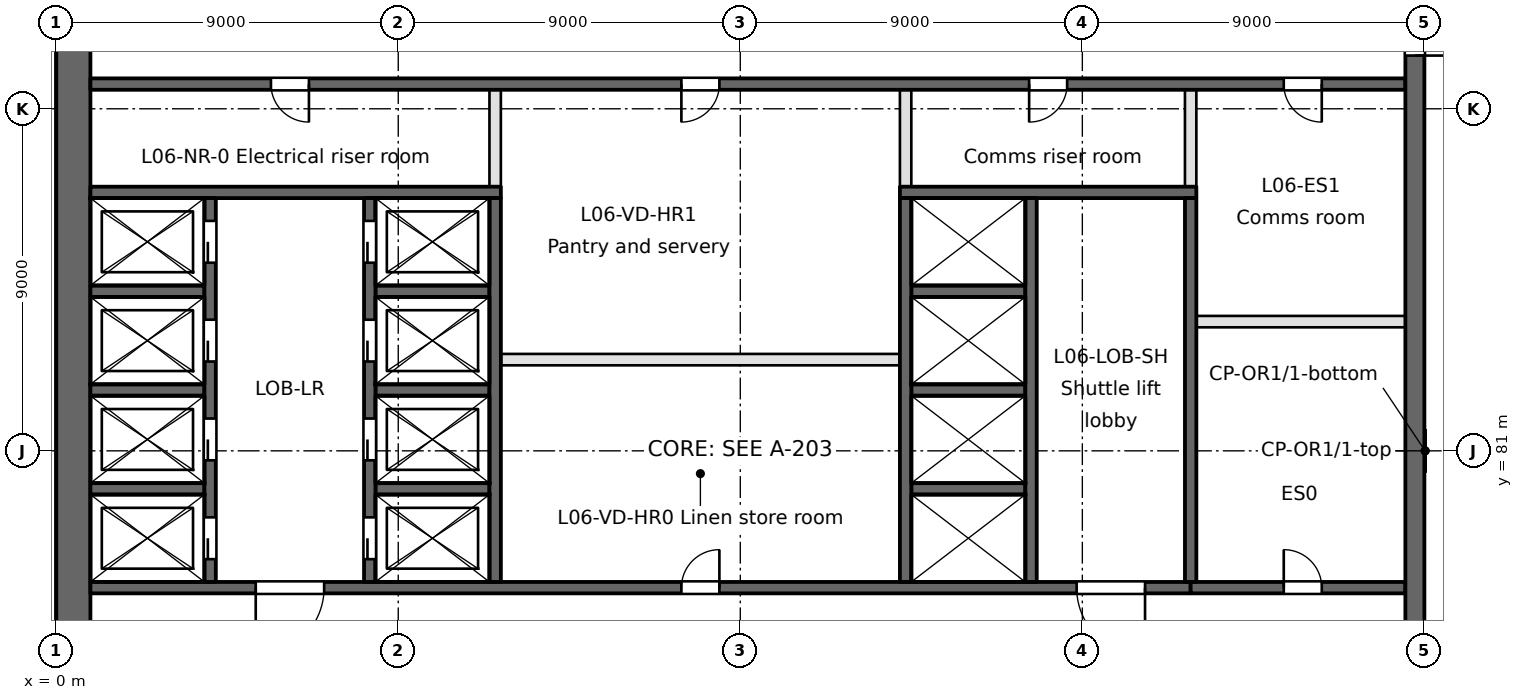
"""IFC4 building model, lengths in metres.
Left out: names, types, materials, properties, quantities, classifications, styles, units other than length and angle.
Written with IfcOpenShell. Run it as: python <this file> out.ifc"""

import sys

from ifc_helpers import new_model, si_unit, direction, frame, frame_2d, origin, place, context, subcontext, project, spatial, rectangle, extrude, element, fill, save


model = new_model("IFC4")
c1 = context("Model", 3, precision=1e-05, world=origin(), true_north=direction((0.0, 1.0)))
c2 = subcontext(c1, "Body", "Model", "MODEL_VIEW")
j1 = project(units=[si_unit("LENGTHUNIT", "METRE"), si_unit("PLANEANGLEUNIT", "RADIAN")], contexts=[c1])
p1 = place(None, origin())
s1 = spatial("IfcSite", under=j1, at=p1, CompositionType="ELEMENT")
p2 = place(p1, origin())
s2 = spatial("IfcBuilding", under=s1, at=p2, CompositionType="ELEMENT")
p3 = place(p2, frame((0.0, 0.0, 31.2)))
s3 = spatial("IfcBuildingStorey", under=s2, at=p3, CompositionType="ELEMENT", Elevation=31.2)
p4 = place(p3, frame((0.45, 94.5, 0.0), z_axis=(0.0, 0.0, 1.0), x_axis=(0.0, -1.0, 0.0)))
e1 = element("IfcWall", 1, at=p4, inside=s3, PredefinedType="SHEAR", context=c2, shape_type="SweptSolid", body=[
    extrude(rectangle(XDim=66.085, YDim=0.9, at=frame_2d((33.042, 0.0))), origin(), (0.0, 0.0, 1.0), 4.6),
])
p5 = place(p3, frame((0.9, 77.4, -0.45), z_axis=(0.0, 0.0, 1.0), x_axis=(1.0, 0.0, 0.0)))
e2 = element("IfcWall", 2, at=p5, inside=s3, PredefinedType="SOLIDWALL", context=c2, shape_type="SweptSolid", body=[
    extrude(rectangle(XDim=28.95, YDim=0.3, at=frame_2d((14.475, 0.0))), origin(), (0.0, 0.0, 1.0), 4.65),
])
p6 = place(p5, frame((4.35, 0.0, 0.45)))
e3 = element("IfcOpeningElement", 3, at=p6, cuts=e2, PredefinedType="OPENING", context=c2, shape_type="SweptSolid", body=[
    extrude(rectangle(XDim=1.8, YDim=2.1, at=frame_2d((0.9, 1.05))), frame((0.0, 0.15, 0.0), z_axis=(0.0, -1.0, 0.0), x_axis=(1.0, 0.0, 0.0)), (0.0, 0.0, 1.0), 0.3),
])
p7 = place(p5, frame((25.95, 0.0, 0.45)))
e4 = element("IfcOpeningElement", 4, at=p7, cuts=e2, PredefinedType="OPENING", context=c2, shape_type="SweptSolid", body=[
    extrude(rectangle(XDim=1.8, YDim=2.1, at=frame_2d((0.9, 1.05))), frame((0.0, 0.15, 0.0), z_axis=(0.0, -1.0, 0.0), x_axis=(1.0, 0.0, 0.0)), (0.0, 0.0, 1.0), 0.3),
])
p8 = place(p5, frame((15.55, 0.0, 0.45)))
e5 = element("IfcOpeningElement", 5, at=p8, cuts=e2, PredefinedType="OPENING", context=c2, shape_type="SweptSolid", body=[
    extrude(rectangle(XDim=1.0, YDim=2.1, at=frame_2d((0.5, 1.05))), frame((0.0, 0.15, 0.0), z_axis=(0.0, -1.0, 0.0), x_axis=(1.0, 0.0, 0.0)), (0.0, 0.0, 1.0), 0.3),
])
p9 = place(p3, frame((29.85, 77.4, 0.0), z_axis=(0.0, 0.0, 1.0), x_axis=(1.0, 0.0, 0.0)))
e6 = element("IfcWall", 6, at=p9, inside=s3, PredefinedType="SOLIDWALL", context=c2, shape_type="SweptSolid", body=[
    extrude(rectangle(XDim=5.65, YDim=0.3, at=frame_2d((2.825, 0.0))), origin(), (0.0, 0.0, 1.0), 4.2),
])
p10 = place(p9, frame((2.45, 0.0, 0.0)))
e7 = element("IfcOpeningElement", 7, at=p10, cuts=e6, PredefinedType="OPENING", context=c2, shape_type="SweptSolid", body=[
    extrude(rectangle(XDim=1.0, YDim=2.1, at=frame_2d((0.5, 1.05))), frame((0.0, 0.15, 0.0), z_axis=(0.0, -1.0, 0.0), x_axis=(1.0, 0.0, 0.0)), (0.0, 0.0, 1.0), 0.3),
])
for number, where, z_axis, x_axis in (
    (8, (0.9, 80.0, -0.45), (0.0, 0.0, 1.0), (1.0, 0.0, 0.0)),
    (9, (8.4, 80.0, -0.45), (0.0, 0.0, 1.0), (1.0, 0.0, 0.0)),
    (10, (22.5, 80.0, -0.45), (0.0, 0.0, 1.0), (1.0, 0.0, 0.0)),
    (11, (0.9, 82.6, -0.45), (0.0, 0.0, 1.0), (1.0, 0.0, 0.0)),
    (12, (8.4, 82.6, -0.45), (0.0, 0.0, 1.0), (1.0, 0.0, 0.0)),
    (13, (22.5, 82.6, -0.45), (0.0, 0.0, 1.0), (1.0, 0.0, 0.0)),
):
    element("IfcWall", number, at=place(p3, frame(where, z_axis=z_axis, x_axis=x_axis)), inside=s3, PredefinedType="SOLIDWALL", context=c2, shape_type="SweptSolid", body=[
        extrude(rectangle(XDim=3.0, YDim=0.3, at=frame_2d((1.5, 0.0))), origin(), (0.0, 0.0, 1.0), 4.65),
    ])
p11 = place(p3, frame((11.7, 83.4, 0.0), z_axis=(0.0, 0.0, 1.0), x_axis=(1.0, 0.0, 0.0)))
e14 = element("IfcWall", 14, at=p11, inside=s3, PredefinedType="PARTITIONING", context=c2, shape_type="SweptSolid", body=[
    extrude(rectangle(XDim=10.5, YDim=0.3, at=frame_2d((5.25, 0.0))), origin(), (0.0, 0.0, 1.0), 4.2),
])
p12 = place(p3, frame((30.0, 84.4, 0.0), z_axis=(0.0, 0.0, 1.0), x_axis=(1.0, 0.0, 0.0)))
e15 = element("IfcWall", 15, at=p12, inside=s3, PredefinedType="PARTITIONING", context=c2, shape_type="SweptSolid", body=[
    extrude(rectangle(XDim=5.5, YDim=0.3, at=frame_2d((2.75, 0.0))), origin(), (0.0, 0.0, 1.0), 4.2),
])
for number, where, z_axis, x_axis in (
    (16, (0.9, 85.2, -0.45), (0.0, 0.0, 1.0), (1.0, 0.0, 0.0)),
    (17, (8.4, 85.2, -0.45), (0.0, 0.0, 1.0), (1.0, 0.0, 0.0)),
    (18, (22.5, 85.2, -0.45), (0.0, 0.0, 1.0), (1.0, 0.0, 0.0)),
):
    element("IfcWall", number, at=place(p3, frame(where, z_axis=z_axis, x_axis=x_axis)), inside=s3, PredefinedType="SOLIDWALL", context=c2, shape_type="SweptSolid", body=[
        extrude(rectangle(XDim=3.0, YDim=0.3, at=frame_2d((1.5, 0.0))), origin(), (0.0, 0.0, 1.0), 4.65),
    ])
p13 = place(p3, frame((0.9, 87.8, -0.45), z_axis=(0.0, 0.0, 1.0), x_axis=(1.0, 0.0, 0.0)))
e19 = element("IfcWall", 19, at=p13, inside=s3, PredefinedType="SOLIDWALL", context=c2, shape_type="SweptSolid", body=[
    extrude(rectangle(XDim=10.8, YDim=0.3, at=frame_2d((5.4, 0.0))), origin(), (0.0, 0.0, 1.0), 4.65),
])
p14 = place(p3, frame((22.2, 87.8, -0.45), z_axis=(0.0, 0.0, 1.0), x_axis=(1.0, 0.0, 0.0)))
e20 = element("IfcWall", 20, at=p14, inside=s3, PredefinedType="SOLIDWALL", context=c2, shape_type="SweptSolid", body=[
    extrude(rectangle(XDim=7.8, YDim=0.3, at=frame_2d((3.9, 0.0))), origin(), (0.0, 0.0, 1.0), 4.65),
])
p15 = place(p3, frame((0.9, 90.65, -0.45), z_axis=(0.0, 0.0, 1.0), x_axis=(1.0, 0.0, 0.0)))
e21 = element("IfcWall", 21, at=p15, inside=s3, PredefinedType="SOLIDWALL", context=c2, shape_type="SweptSolid", body=[
    extrude(rectangle(XDim=34.6, YDim=0.3, at=frame_2d((17.3, 0.0))), origin(), (0.0, 0.0, 1.0), 4.65),
])
p16 = place(p15, frame((4.75, 0.0, 0.45)))
e22 = element("IfcOpeningElement", 22, at=p16, cuts=e21, PredefinedType="OPENING", context=c2, shape_type="SweptSolid", body=[
    extrude(rectangle(XDim=1.0, YDim=2.1, at=frame_2d((0.5, 1.05))), frame((0.0, 0.15, 0.0), z_axis=(0.0, -1.0, 0.0), x_axis=(1.0, 0.0, 0.0)), (0.0, 0.0, 1.0), 0.3),
])
p17 = place(p15, frame((24.7, 0.0, 0.45)))
e23 = element("IfcOpeningElement", 23, at=p17, cuts=e21, PredefinedType="OPENING", context=c2, shape_type="SweptSolid", body=[
    extrude(rectangle(XDim=1.0, YDim=2.1, at=frame_2d((0.5, 1.05))), frame((0.0, 0.15, 0.0), z_axis=(0.0, -1.0, 0.0), x_axis=(1.0, 0.0, 0.0)), (0.0, 0.0, 1.0), 0.3),
])
p18 = place(p15, frame((15.55, 0.0, 0.45)))
e24 = element("IfcOpeningElement", 24, at=p18, cuts=e21, PredefinedType="OPENING", context=c2, shape_type="SweptSolid", body=[
    extrude(rectangle(XDim=1.0, YDim=2.1, at=frame_2d((0.5, 1.05))), frame((0.0, 0.15, 0.0), z_axis=(0.0, -1.0, 0.0), x_axis=(1.0, 0.0, 0.0)), (0.0, 0.0, 1.0), 0.3),
])
p19 = place(p15, frame((31.4, 0.0, 0.45)))
e25 = element("IfcOpeningElement", 25, at=p19, cuts=e21, PredefinedType="OPENING", context=c2, shape_type="SweptSolid", body=[
    extrude(rectangle(XDim=1.0, YDim=2.1, at=frame_2d((0.5, 1.05))), frame((0.0, 0.15, 0.0), z_axis=(0.0, -1.0, 0.0), x_axis=(1.0, 0.0, 0.0)), (0.0, 0.0, 1.0), 0.3),
])
p20 = place(p3, frame((4.05, 77.55, -0.45), z_axis=(0.0, 0.0, 1.0), x_axis=(0.0, 1.0, 0.0)))
e26 = element("IfcWall", 26, at=p20, inside=s3, PredefinedType="SOLIDWALL", context=c2, shape_type="SweptSolid", body=[
    extrude(rectangle(XDim=10.1, YDim=0.3, at=frame_2d((5.05, 0.0))), origin(), (0.0, 0.0, 1.0), 4.65),
])
p21 = place(p20, frame((0.6, 0.0, 0.45)))
e27 = element("IfcOpeningElement", 27, at=p21, cuts=e26, PredefinedType="OPENING", context=c2, shape_type="SweptSolid", body=[
    extrude(rectangle(XDim=1.1, YDim=2.1, at=frame_2d((0.55, 1.05))), frame((0.0, 0.15, 0.0), z_axis=(0.0, -1.0, 0.0), x_axis=(1.0, 0.0, 0.0)), (0.0, 0.0, 1.0), 0.3),
])
p22 = place(p20, frame((3.2, 0.0, 0.45)))
e28 = element("IfcOpeningElement", 28, at=p22, cuts=e26, PredefinedType="OPENING", context=c2, shape_type="SweptSolid", body=[
    extrude(rectangle(XDim=1.1, YDim=2.1, at=frame_2d((0.55, 1.05))), frame((0.0, 0.15, 0.0), z_axis=(0.0, -1.0, 0.0), x_axis=(1.0, 0.0, 0.0)), (0.0, 0.0, 1.0), 0.3),
])
p23 = place(p20, frame((5.8, 0.0, 0.45)))
e29 = element("IfcOpeningElement", 29, at=p23, cuts=e26, PredefinedType="OPENING", context=c2, shape_type="SweptSolid", body=[
    extrude(rectangle(XDim=1.1, YDim=2.1, at=frame_2d((0.55, 1.05))), frame((0.0, 0.15, 0.0), z_axis=(0.0, -1.0, 0.0), x_axis=(1.0, 0.0, 0.0)), (0.0, 0.0, 1.0), 0.3),
])
p24 = place(p20, frame((8.4, 0.0, 0.45)))
e30 = element("IfcOpeningElement", 30, at=p24, cuts=e26, PredefinedType="OPENING", context=c2, shape_type="SweptSolid", body=[
    extrude(rectangle(XDim=1.1, YDim=2.1, at=frame_2d((0.55, 1.05))), frame((0.0, 0.15, 0.0), z_axis=(0.0, -1.0, 0.0), x_axis=(1.0, 0.0, 0.0)), (0.0, 0.0, 1.0), 0.3),
])
p25 = place(p3, frame((8.25, 77.55, -0.45), z_axis=(0.0, 0.0, 1.0), x_axis=(0.0, 1.0, 0.0)))
e31 = element("IfcWall", 31, at=p25, inside=s3, PredefinedType="SOLIDWALL", context=c2, shape_type="SweptSolid", body=[
    extrude(rectangle(XDim=10.1, YDim=0.3, at=frame_2d((5.05, 0.0))), origin(), (0.0, 0.0, 1.0), 4.65),
])
p26 = place(p25, frame((0.6, 0.0, 0.45)))
e32 = element("IfcOpeningElement", 32, at=p26, cuts=e31, PredefinedType="OPENING", context=c2, shape_type="SweptSolid", body=[
    extrude(rectangle(XDim=1.1, YDim=2.1, at=frame_2d((0.55, 1.05))), frame((0.0, 0.15, 0.0), z_axis=(0.0, -1.0, 0.0), x_axis=(1.0, 0.0, 0.0)), (0.0, 0.0, 1.0), 0.3),
])
p27 = place(p25, frame((3.2, 0.0, 0.45)))
e33 = element("IfcOpeningElement", 33, at=p27, cuts=e31, PredefinedType="OPENING", context=c2, shape_type="SweptSolid", body=[
    extrude(rectangle(XDim=1.1, YDim=2.1, at=frame_2d((0.55, 1.05))), frame((0.0, 0.15, 0.0), z_axis=(0.0, -1.0, 0.0), x_axis=(1.0, 0.0, 0.0)), (0.0, 0.0, 1.0), 0.3),
])
p28 = place(p25, frame((5.8, 0.0, 0.45)))
e34 = element("IfcOpeningElement", 34, at=p28, cuts=e31, PredefinedType="OPENING", context=c2, shape_type="SweptSolid", body=[
    extrude(rectangle(XDim=1.1, YDim=2.1, at=frame_2d((0.55, 1.05))), frame((0.0, 0.15, 0.0), z_axis=(0.0, -1.0, 0.0), x_axis=(1.0, 0.0, 0.0)), (0.0, 0.0, 1.0), 0.3),
])
p29 = place(p25, frame((8.4, 0.0, 0.45)))
e35 = element("IfcOpeningElement", 35, at=p29, cuts=e31, PredefinedType="OPENING", context=c2, shape_type="SweptSolid", body=[
    extrude(rectangle(XDim=1.1, YDim=2.1, at=frame_2d((0.55, 1.05))), frame((0.0, 0.15, 0.0), z_axis=(0.0, -1.0, 0.0), x_axis=(1.0, 0.0, 0.0)), (0.0, 0.0, 1.0), 0.3),
])
p30 = place(p3, frame((11.55, 77.55, -0.45), z_axis=(0.0, 0.0, 1.0), x_axis=(0.0, 1.0, 0.0)))
e36 = element("IfcWall", 36, at=p30, inside=s3, PredefinedType="SOLIDWALL", context=c2, shape_type="SweptSolid", body=[
    extrude(rectangle(XDim=10.1, YDim=0.3, at=frame_2d((5.05, 0.0))), origin(), (0.0, 0.0, 1.0), 4.65),
])
p31 = place(p3, frame((11.55, 87.95, 0.0), z_axis=(0.0, 0.0, 1.0), x_axis=(0.0, 1.0, 0.0)))
e37 = element("IfcWall", 37, at=p31, inside=s3, PredefinedType="PARTITIONING", context=c2, shape_type="SweptSolid", body=[
    extrude(rectangle(XDim=2.55, YDim=0.3, at=frame_2d((1.275, 0.0))), origin(), (0.0, 0.0, 1.0), 4.2),
])
p32 = place(p3, frame((22.35, 77.55, -0.45), z_axis=(0.0, 0.0, 1.0), x_axis=(0.0, 1.0, 0.0)))
e38 = element("IfcWall", 38, at=p32, inside=s3, PredefinedType="SOLIDWALL", context=c2, shape_type="SweptSolid", body=[
    extrude(rectangle(XDim=10.1, YDim=0.3, at=frame_2d((5.05, 0.0))), origin(), (0.0, 0.0, 1.0), 4.65),
])
p33 = place(p3, frame((22.35, 87.95, 0.0), z_axis=(0.0, 0.0, 1.0), x_axis=(0.0, 1.0, 0.0)))
e39 = element("IfcWall", 39, at=p33, inside=s3, PredefinedType="PARTITIONING", context=c2, shape_type="SweptSolid", body=[
    extrude(rectangle(XDim=2.55, YDim=0.3, at=frame_2d((1.275, 0.0))), origin(), (0.0, 0.0, 1.0), 4.2),
])
for number, where, z_axis, x_axis in (
    (40, (25.65, 77.55, -0.45), (0.0, 0.0, 1.0), (0.0, 1.0, 0.0)),
    (41, (29.85, 77.55, -0.45), (0.0, 0.0, 1.0), (0.0, 1.0, 0.0)),
):
    element("IfcWall", number, at=place(p3, frame(where, z_axis=z_axis, x_axis=x_axis)), inside=s3, PredefinedType="SOLIDWALL", context=c2, shape_type="SweptSolid", body=[
        extrude(rectangle(XDim=10.1, YDim=0.3, at=frame_2d((5.05, 0.0))), origin(), (0.0, 0.0, 1.0), 4.65),
    ])
p34 = place(p3, frame((29.85, 87.95, 0.0), z_axis=(0.0, 0.0, 1.0), x_axis=(0.0, 1.0, 0.0)))
e42 = element("IfcWall", 42, at=p34, inside=s3, PredefinedType="PARTITIONING", context=c2, shape_type="SweptSolid", body=[
    extrude(rectangle(XDim=2.55, YDim=0.3, at=frame_2d((1.275, 0.0))), origin(), (0.0, 0.0, 1.0), 4.2),
])
p35 = place(p3, frame((35.75, 63.5, -0.45), z_axis=(0.0, 0.0, 1.0), x_axis=(0.0, 1.0, 0.0)))
e43 = element("IfcWall", 43, at=p35, inside=s3, PredefinedType="SOLIDWALL", context=c2, shape_type="SweptSolid", body=[
    extrude(rectangle(XDim=34.6, YDim=0.5, at=frame_2d((17.3, 0.0))), origin(), (0.0, 0.0, 1.0), 4.65),
])
p36 = place(p35, frame((9.7, 0.0, 0.45)))
e44 = element("IfcOpeningElement", 44, at=p36, cuts=e43, PredefinedType="OPENING", context=c2, shape_type="SweptSolid", body=[
    extrude(rectangle(XDim=2.4, YDim=2.1, at=frame_2d((1.2, 1.05))), frame((0.0, 0.25, 0.0), z_axis=(0.0, -1.0, 0.0), x_axis=(1.0, 0.0, 0.0)), (0.0, 0.0, 1.0), 0.5),
])
p37 = place(p35, frame((27.9, 0.0, 0.45)))
e45 = element("IfcOpeningElement", 45, at=p37, cuts=e43, PredefinedType="OPENING", context=c2, shape_type="SweptSolid", body=[
    extrude(rectangle(XDim=1.5, YDim=2.1, at=frame_2d((0.75, 1.05))), frame((0.0, 0.25, 0.0), z_axis=(0.0, -1.0, 0.0), x_axis=(1.0, 0.0, 0.0)), (0.0, 0.0, 1.0), 0.5),
])
p38 = place(p35, frame((1.5, 0.0, 0.45)))
e46 = element("IfcOpeningElement", 46, at=p38, cuts=e43, PredefinedType="OPENING", context=c2, shape_type="SweptSolid", body=[
    extrude(rectangle(XDim=1.2, YDim=2.1, at=frame_2d((0.6, 1.05))), frame((0.0, 0.25, 0.0), z_axis=(0.0, -1.0, 0.0), x_axis=(1.0, 0.0, 0.0)), (0.0, 0.0, 1.0), 0.5),
])
p39 = place(p21, origin())
e47 = element("IfcDoor", 47, at=p39, inside=s3, OperationType="SLIDING_TO_RIGHT", PredefinedType="DOOR", context=c2, shape_type="SweptSolid", body=[
    extrude(rectangle(XDim=1.1, YDim=2.1, at=frame_2d((0.55, 1.05))), frame((0.0, 0.025, 0.0), z_axis=(0.0, -1.0, 0.0), x_axis=(1.0, 0.0, 0.0)), (0.0, 0.0, 1.0), 0.05),
])
fill(e27, e47)
p40 = place(p22, origin())
e48 = element("IfcDoor", 48, at=p40, inside=s3, OperationType="SLIDING_TO_LEFT", PredefinedType="DOOR", context=c2, shape_type="SweptSolid", body=[
    extrude(rectangle(XDim=1.1, YDim=2.1, at=frame_2d((0.55, 1.05))), frame((0.0, 0.025, 0.0), z_axis=(0.0, -1.0, 0.0), x_axis=(1.0, 0.0, 0.0)), (0.0, 0.0, 1.0), 0.05),
])
fill(e28, e48)
p41 = place(p23, origin())
e49 = element("IfcDoor", 49, at=p41, inside=s3, OperationType="SLIDING_TO_RIGHT", PredefinedType="DOOR", context=c2, shape_type="SweptSolid", body=[
    extrude(rectangle(XDim=1.1, YDim=2.1, at=frame_2d((0.55, 1.05))), frame((0.0, 0.025, 0.0), z_axis=(0.0, -1.0, 0.0), x_axis=(1.0, 0.0, 0.0)), (0.0, 0.0, 1.0), 0.05),
])
fill(e29, e49)
p42 = place(p24, origin())
e50 = element("IfcDoor", 50, at=p42, inside=s3, OperationType="SLIDING_TO_LEFT", PredefinedType="DOOR", context=c2, shape_type="SweptSolid", body=[
    extrude(rectangle(XDim=1.1, YDim=2.1, at=frame_2d((0.55, 1.05))), frame((0.0, 0.025, 0.0), z_axis=(0.0, -1.0, 0.0), x_axis=(1.0, 0.0, 0.0)), (0.0, 0.0, 1.0), 0.05),
])
fill(e30, e50)
p43 = place(p26, origin())
e51 = element("IfcDoor", 51, at=p43, inside=s3, OperationType="SLIDING_TO_RIGHT", PredefinedType="DOOR", context=c2, shape_type="SweptSolid", body=[
    extrude(rectangle(XDim=1.1, YDim=2.1, at=frame_2d((0.55, 1.05))), frame((0.0, 0.025, 0.0), z_axis=(0.0, -1.0, 0.0), x_axis=(1.0, 0.0, 0.0)), (0.0, 0.0, 1.0), 0.05),
])
fill(e32, e51)
p44 = place(p27, origin())
e52 = element("IfcDoor", 52, at=p44, inside=s3, OperationType="SLIDING_TO_LEFT", PredefinedType="DOOR", context=c2, shape_type="SweptSolid", body=[
    extrude(rectangle(XDim=1.1, YDim=2.1, at=frame_2d((0.55, 1.05))), frame((0.0, 0.025, 0.0), z_axis=(0.0, -1.0, 0.0), x_axis=(1.0, 0.0, 0.0)), (0.0, 0.0, 1.0), 0.05),
])
fill(e33, e52)
p45 = place(p28, origin())
e53 = element("IfcDoor", 53, at=p45, inside=s3, OperationType="SLIDING_TO_RIGHT", PredefinedType="DOOR", context=c2, shape_type="SweptSolid", body=[
    extrude(rectangle(XDim=1.1, YDim=2.1, at=frame_2d((0.55, 1.05))), frame((0.0, 0.025, 0.0), z_axis=(0.0, -1.0, 0.0), x_axis=(1.0, 0.0, 0.0)), (0.0, 0.0, 1.0), 0.05),
])
fill(e34, e53)
p46 = place(p29, origin())
e54 = element("IfcDoor", 54, at=p46, inside=s3, OperationType="SLIDING_TO_LEFT", PredefinedType="DOOR", context=c2, shape_type="SweptSolid", body=[
    extrude(rectangle(XDim=1.1, YDim=2.1, at=frame_2d((0.55, 1.05))), frame((0.0, 0.025, 0.0), z_axis=(0.0, -1.0, 0.0), x_axis=(1.0, 0.0, 0.0)), (0.0, 0.0, 1.0), 0.05),
])
fill(e35, e54)
p47 = place(p6, frame((1.8, 0.0, 0.0), z_axis=(0.0, 0.0, 1.0), x_axis=(-1.0, 0.0, 0.0)))
e55 = element("IfcDoor", 55, at=p47, inside=s3, OperationType="SINGLE_SWING_RIGHT", PredefinedType="DOOR", context=c2, shape_type="SweptSolid", body=[
    extrude(rectangle(XDim=1.8, YDim=2.1, at=frame_2d((0.9, 1.05))), frame((0.0, 0.025, 0.0), z_axis=(0.0, -1.0, 0.0), x_axis=(1.0, 0.0, 0.0)), (0.0, 0.0, 1.0), 0.05),
])
fill(e3, e55)
p48 = place(p7, frame((1.8, 0.0, 0.0), z_axis=(0.0, 0.0, 1.0), x_axis=(-1.0, 0.0, 0.0)))
e56 = element("IfcDoor", 56, at=p48, inside=s3, OperationType="SINGLE_SWING_LEFT", PredefinedType="DOOR", context=c2, shape_type="SweptSolid", body=[
    extrude(rectangle(XDim=1.8, YDim=2.1, at=frame_2d((0.9, 1.05))), frame((0.0, 0.025, 0.0), z_axis=(0.0, -1.0, 0.0), x_axis=(1.0, 0.0, 0.0)), (0.0, 0.0, 1.0), 0.05),
])
fill(e4, e56)
p49 = place(p37, frame((1.5, 0.0, 0.0), z_axis=(0.0, 0.0, 1.0), x_axis=(-1.0, 0.0, 0.0)))
e57 = element("IfcDoor", 57, at=p49, inside=s3, OperationType="SINGLE_SWING_RIGHT", PredefinedType="DOOR", context=c2, shape_type="SweptSolid", body=[
    extrude(rectangle(XDim=1.5, YDim=2.1, at=frame_2d((0.75, 1.05))), frame((0.0, 0.025, 0.0), z_axis=(0.0, -1.0, 0.0), x_axis=(1.0, 0.0, 0.0)), (0.0, 0.0, 1.0), 0.05),
])
fill(e45, e57)
p50 = place(p16, frame((1.0, 0.0, 0.0), z_axis=(0.0, 0.0, 1.0), x_axis=(-1.0, 0.0, 0.0)))
e58 = element("IfcDoor", 58, at=p50, inside=s3, OperationType="SINGLE_SWING_LEFT", PredefinedType="DOOR", context=c2, shape_type="SweptSolid", body=[
    extrude(rectangle(XDim=1.0, YDim=2.1, at=frame_2d((0.5, 1.05))), frame((0.0, 0.025, 0.0), z_axis=(0.0, -1.0, 0.0), x_axis=(1.0, 0.0, 0.0)), (0.0, 0.0, 1.0), 0.05),
])
fill(e22, e58)
p51 = place(p17, frame((1.0, 0.0, 0.0), z_axis=(0.0, 0.0, 1.0), x_axis=(-1.0, 0.0, 0.0)))
e59 = element("IfcDoor", 59, at=p51, inside=s3, OperationType="SINGLE_SWING_RIGHT", PredefinedType="DOOR", context=c2, shape_type="SweptSolid", body=[
    extrude(rectangle(XDim=1.0, YDim=2.1, at=frame_2d((0.5, 1.05))), frame((0.0, 0.025, 0.0), z_axis=(0.0, -1.0, 0.0), x_axis=(1.0, 0.0, 0.0)), (0.0, 0.0, 1.0), 0.05),
])
fill(e23, e59)
p52 = place(p8, origin())
e60 = element("IfcDoor", 60, at=p52, inside=s3, OperationType="SINGLE_SWING_RIGHT", PredefinedType="DOOR", context=c2, shape_type="SweptSolid", body=[
    extrude(rectangle(XDim=1.0, YDim=2.1, at=frame_2d((0.5, 1.05))), frame((0.0, 0.025, 0.0), z_axis=(0.0, -1.0, 0.0), x_axis=(1.0, 0.0, 0.0)), (0.0, 0.0, 1.0), 0.05),
])
fill(e5, e60)
p53 = place(p18, frame((1.0, 0.0, 0.0), z_axis=(0.0, 0.0, 1.0), x_axis=(-1.0, 0.0, 0.0)))
e61 = element("IfcDoor", 61, at=p53, inside=s3, OperationType="SINGLE_SWING_RIGHT", PredefinedType="DOOR", context=c2, shape_type="SweptSolid", body=[
    extrude(rectangle(XDim=1.0, YDim=2.1, at=frame_2d((0.5, 1.05))), frame((0.0, 0.025, 0.0), z_axis=(0.0, -1.0, 0.0), x_axis=(1.0, 0.0, 0.0)), (0.0, 0.0, 1.0), 0.05),
])
fill(e24, e61)
p54 = place(p10, origin())
e62 = element("IfcDoor", 62, at=p54, inside=s3, OperationType="SINGLE_SWING_LEFT", PredefinedType="DOOR", context=c2, shape_type="SweptSolid", body=[
    extrude(rectangle(XDim=1.0, YDim=2.1, at=frame_2d((0.5, 1.05))), frame((0.0, 0.025, 0.0), z_axis=(0.0, -1.0, 0.0), x_axis=(1.0, 0.0, 0.0)), (0.0, 0.0, 1.0), 0.05),
])
fill(e7, e62)
p55 = place(p19, frame((1.0, 0.0, 0.0), z_axis=(0.0, 0.0, 1.0), x_axis=(-1.0, 0.0, 0.0)))
e63 = element("IfcDoor", 63, at=p55, inside=s3, OperationType="SINGLE_SWING_LEFT", PredefinedType="DOOR", context=c2, shape_type="SweptSolid", body=[
    extrude(rectangle(XDim=1.0, YDim=2.1, at=frame_2d((0.5, 1.05))), frame((0.0, 0.025, 0.0), z_axis=(0.0, -1.0, 0.0), x_axis=(1.0, 0.0, 0.0)), (0.0, 0.0, 1.0), 0.05),
])
fill(e25, e63)
save(model, sys.argv[1])
